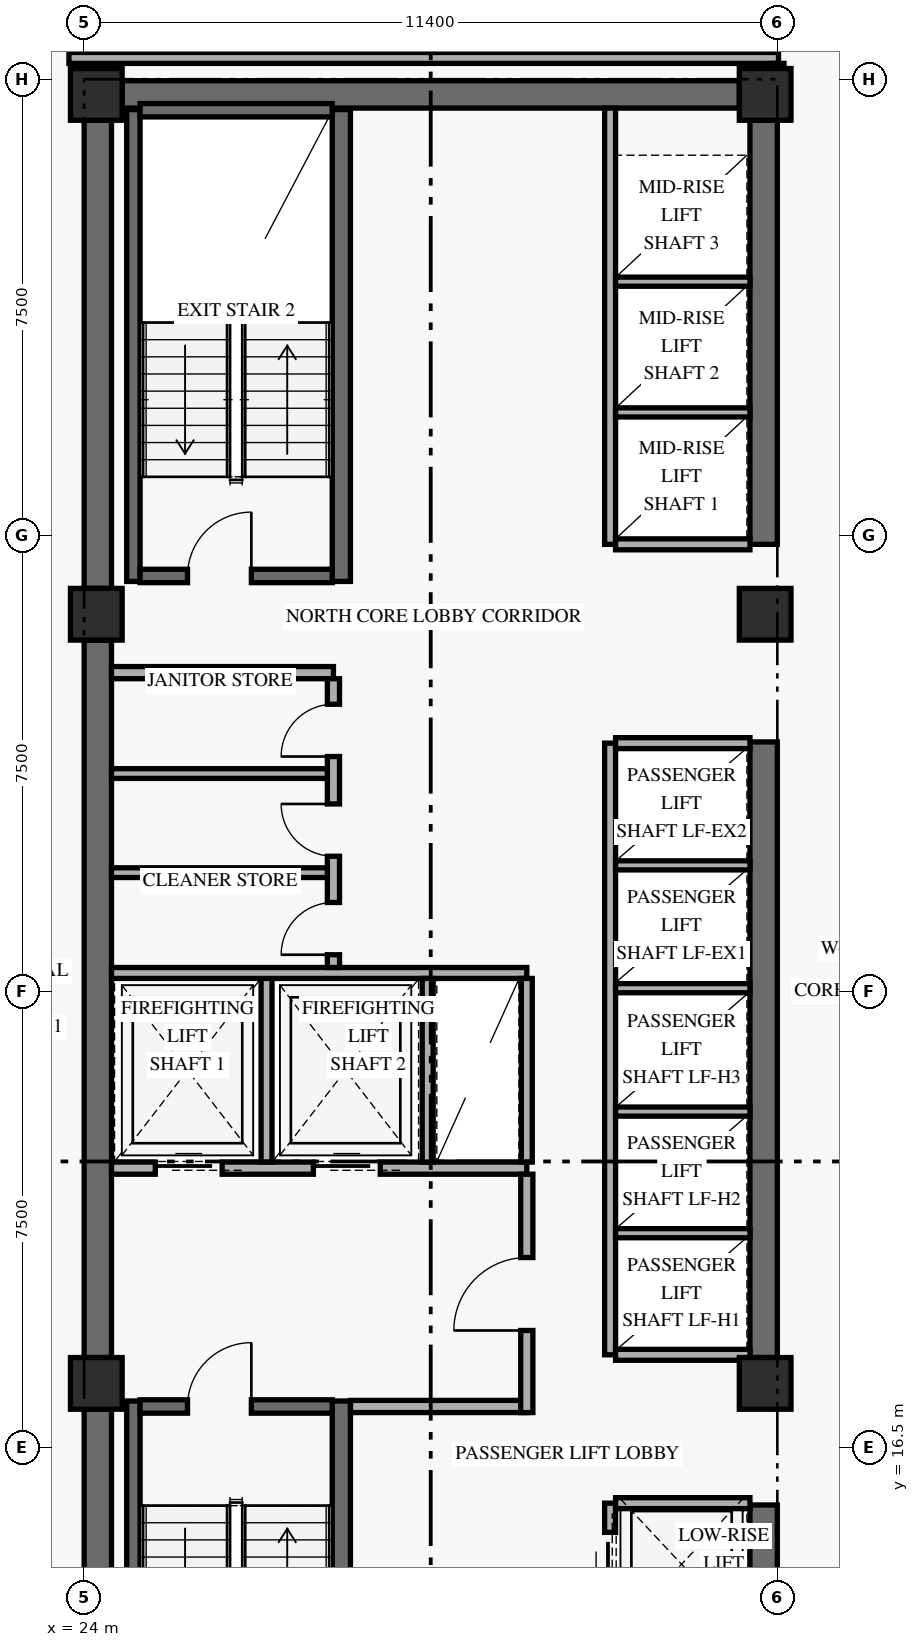
"""IFC4 building model, lengths in metres.
Left out: names, types, materials, properties, quantities, classifications, styles, units other than length and angle.
Written with IfcOpenShell. Run it as: python <this file> out.ifc"""

import sys

from ifc_helpers import new_model, si_unit, direction, frame, frame_2d, origin, origin_2d, place, context, subcontext, project, spatial, rectangle, extrude, element, fill, save


model = new_model("IFC4")
c1 = context("Model", 3, precision=1e-05, world=origin(), true_north=direction((0.0, 1.0)))
c2 = subcontext(c1, "Body", "Model", "MODEL_VIEW")
j1 = project(units=[si_unit("LENGTHUNIT", "METRE"), si_unit("PLANEANGLEUNIT", "RADIAN")], contexts=[c1])
p1 = place(None, origin())
s1 = spatial("IfcSite", under=j1, at=p1, CompositionType="ELEMENT")
p2 = place(p1, origin())
s2 = spatial("IfcBuilding", under=s1, at=p2, CompositionType="ELEMENT")
p3 = place(p2, frame((0.0, 0.0, 42.0)))
s3 = spatial("IfcBuildingStorey", under=s2, at=p3, CompositionType="ELEMENT", Elevation=42.0)
p4 = place(p3, frame((24.225, 9.675, 0.0), z_axis=(0.0, 0.0, 1.0), x_axis=(0.0, 1.0, 0.0)))
e1 = element("IfcWall", 1, at=p4, inside=s3, PredefinedType="SHEAR", context=c2, shape_type="SweptSolid", body=[
    extrude(rectangle(XDim=7.45, YDim=0.45, at=frame_2d((3.725, 0.0))), origin(), (0.0, 0.0, 1.0), 2.667),
])
p5 = place(p3, frame((24.225, 17.975, 0.0), z_axis=(0.0, 0.0, 1.0), x_axis=(0.0, 1.0, 0.0)))
e2 = element("IfcWall", 2, at=p5, inside=s3, PredefinedType="SHEAR", context=c2, shape_type="SweptSolid", body=[
    extrude(rectangle(XDim=11.8, YDim=0.45, at=frame_2d((5.9, 0.0))), origin(), (0.0, 0.0, 1.0), 2.667),
])
p6 = place(p3, frame((24.225, 30.625, 0.0), z_axis=(0.0, 0.0, 1.0), x_axis=(0.0, 1.0, 0.0)))
e3 = element("IfcWall", 3, at=p6, inside=s3, PredefinedType="SHEAR", context=c2, shape_type="SweptSolid", body=[
    extrude(rectangle(XDim=7.7, YDim=0.45, at=frame_2d((3.85, 0.0))), origin(), (0.0, 0.0, 1.0), 2.667),
])
p7 = place(p3, frame((35.175, 9.675, 0.0), z_axis=(0.0, 0.0, 1.0), x_axis=(0.0, 1.0, 0.0)))
e4 = element("IfcWall", 4, at=p7, inside=s3, PredefinedType="SHEAR", context=c2, shape_type="SweptSolid", body=[
    extrude(rectangle(XDim=5.875, YDim=0.45, at=frame_2d((2.938, 0.0))), origin(), (0.0, 0.0, 1.0), 2.667),
])
p8 = place(p3, frame((35.175, 17.975, 0.0), z_axis=(0.0, 0.0, 1.0), x_axis=(0.0, 1.0, 0.0)))
e5 = element("IfcWall", 5, at=p8, inside=s3, PredefinedType="SHEAR", context=c2, shape_type="SweptSolid", body=[
    extrude(rectangle(XDim=10.125, YDim=0.45, at=frame_2d((5.062, 0.0))), origin(), (0.0, 0.0, 1.0), 2.667),
])
p9 = place(p3, frame((35.175, 31.35, 0.0), z_axis=(0.0, 0.0, 1.0), x_axis=(0.0, 1.0, 0.0)))
e6 = element("IfcWall", 6, at=p9, inside=s3, PredefinedType="SHEAR", context=c2, shape_type="SweptSolid", body=[
    extrude(rectangle(XDim=6.975, YDim=0.45, at=frame_2d((3.487, 0.0))), origin(), (0.0, 0.0, 1.0), 2.667),
])
p10 = place(p3, frame((24.625, 38.75, 0.0), z_axis=(0.0, 0.0, 1.0), x_axis=(1.0, 0.0, 0.0)))
e7 = element("IfcWall", 7, at=p10, inside=s3, PredefinedType="SHEAR", context=c2, shape_type="SweptSolid", body=[
    extrude(rectangle(XDim=10.15, YDim=0.45, at=frame_2d((5.075, 0.0))), origin(), (0.0, 0.0, 1.0), 3.36),
])
p11 = place(p3, frame((24.81, 9.5, 0.0), z_axis=(0.0, 0.0, 1.0), x_axis=(0.0, 1.0, 0.0)))
e8 = element("IfcWall", 8, at=p11, inside=s3, PredefinedType="SHEAR", context=c2, shape_type="SweptSolid", body=[
    extrude(rectangle(XDim=7.76, YDim=0.22, at=frame_2d((3.88, 0.0))), origin(), (0.0, 0.0, 1.0), 3.36),
])
p12 = place(p3, frame((28.23, 9.5, 0.0), z_axis=(0.0, 0.0, 1.0), x_axis=(0.0, 1.0, 0.0)))
e9 = element("IfcWall", 9, at=p12, inside=s3, PredefinedType="SHEAR", context=c2, shape_type="SweptSolid", body=[
    extrude(rectangle(XDim=7.76, YDim=0.3, at=frame_2d((3.88, 0.0))), origin(), (0.0, 0.0, 1.0), 3.36),
])
p13 = place(p3, frame((24.92, 17.17, 0.0), z_axis=(0.0, 0.0, 1.0), x_axis=(1.0, 0.0, 0.0)))
e10 = element("IfcWall", 10, at=p13, inside=s3, PredefinedType="SHEAR", context=c2, shape_type="SweptSolid", body=[
    extrude(rectangle(XDim=3.16, YDim=0.22, at=frame_2d((1.58, 0.0))), origin(), (0.0, 0.0, 1.0), 3.36),
])
p14 = place(p13, frame((0.78, 0.0, 0.0)))
e11 = element("IfcOpeningElement", 11, at=p14, cuts=e10, PredefinedType="OPENING", context=c2, shape_type="SweptSolid", body=[
    extrude(rectangle(XDim=1.05, YDim=2.15, at=frame_2d((0.525, 1.075))), frame((0.0, 0.12, 0.0), z_axis=(0.0, -1.0, 0.0), x_axis=(1.0, 0.0, 0.0)), (0.0, 0.0, 1.0), 0.24),
])
p15 = place(p3, frame((24.81, 30.74, 0.0), z_axis=(0.0, 0.0, 1.0), x_axis=(0.0, 1.0, 0.0)))
e12 = element("IfcWall", 12, at=p15, inside=s3, PredefinedType="SHEAR", context=c2, shape_type="SweptSolid", body=[
    extrude(rectangle(XDim=7.76, YDim=0.22, at=frame_2d((3.88, 0.0))), origin(), (0.0, 0.0, 1.0), 3.36),
])
p16 = place(p3, frame((28.23, 30.74, 0.0), z_axis=(0.0, 0.0, 1.0), x_axis=(0.0, 1.0, 0.0)))
e13 = element("IfcWall", 13, at=p16, inside=s3, PredefinedType="SHEAR", context=c2, shape_type="SweptSolid", body=[
    extrude(rectangle(XDim=7.76, YDim=0.3, at=frame_2d((3.88, 0.0))), origin(), (0.0, 0.0, 1.0), 3.36),
])
p17 = place(p3, frame((24.92, 30.83, 0.0), z_axis=(0.0, 0.0, 1.0), x_axis=(1.0, 0.0, 0.0)))
e14 = element("IfcWall", 14, at=p17, inside=s3, PredefinedType="SHEAR", context=c2, shape_type="SweptSolid", body=[
    extrude(rectangle(XDim=3.16, YDim=0.22, at=frame_2d((1.58, 0.0))), origin(), (0.0, 0.0, 1.0), 3.36),
])
p18 = place(p17, frame((0.78, 0.0, 0.0)))
e15 = element("IfcOpeningElement", 15, at=p18, cuts=e14, PredefinedType="OPENING", context=c2, shape_type="SweptSolid", body=[
    extrude(rectangle(XDim=1.05, YDim=2.15, at=frame_2d((0.525, 1.075))), frame((0.0, 0.12, 0.0), z_axis=(0.0, -1.0, 0.0), x_axis=(1.0, 0.0, 0.0)), (0.0, 0.0, 1.0), 0.24),
])
p19 = place(p3, frame((24.92, 38.49, 0.0), z_axis=(0.0, 0.0, 1.0), x_axis=(1.0, 0.0, 0.0)))
e16 = element("IfcWall", 16, at=p19, inside=s3, PredefinedType="SHEAR", context=c2, shape_type="SweptSolid", body=[
    extrude(rectangle(XDim=3.16, YDim=0.22, at=frame_2d((1.58, 0.0))), origin(), (0.0, 0.0, 1.0), 3.36),
])
for number, where, z_axis, x_axis in (
    (17, (24.2, 17.55, 0.0), (0.0, 0.0, 1.0), (1.0, 0.0, 0.0)),
    (18, (24.2, 30.2, 0.0), (0.0, 0.0, 1.0), (1.0, 0.0, 0.0)),
    (19, (24.2, 38.75, 0.0), (0.0, 0.0, 1.0), (1.0, 0.0, 0.0)),
    (20, (35.2, 17.55, 0.0), (0.0, 0.0, 1.0), (1.0, 0.0, 0.0)),
    (21, (35.2, 30.2, 0.0), (0.0, 0.0, 1.0), (1.0, 0.0, 0.0)),
    (22, (35.2, 38.75, 0.0), (0.0, 0.0, 1.0), (1.0, 0.0, 0.0)),
):
    element("IfcColumn", number, at=place(p3, frame(where, z_axis=z_axis, x_axis=x_axis)), inside=s3, PredefinedType="COLUMN", context=c2, shape_type="SweptSolid", body=[
        extrude(rectangle(XDim=0.85, YDim=0.85, at=origin_2d()), origin(), (0.0, 0.0, 1.0), 3.6),
    ])
p20 = place(p3, frame((24.45, 21.09, 0.0), z_axis=(0.0, 0.0, 1.0), x_axis=(1.0, 0.0, 0.0)))
e23 = element("IfcWall", 23, at=p20, inside=s3, PredefinedType="STANDARD", context=c2, shape_type="SweptSolid", body=[
    extrude(rectangle(XDim=6.83, YDim=0.2, at=frame_2d((3.415, 0.0))), origin(), (0.0, 0.0, 1.0), 3.36),
])
p21 = place(p20, frame((0.72, 0.0, 0.0)))
e24 = element("IfcOpeningElement", 24, at=p21, cuts=e23, PredefinedType="OPENING", context=c2, shape_type="SweptSolid", body=[
    extrude(rectangle(XDim=1.1, YDim=2.2, at=frame_2d((0.55, 1.1))), frame((0.0, 0.11, 0.0), z_axis=(0.0, -1.0, 0.0), x_axis=(1.0, 0.0, 0.0)), (0.0, 0.0, 1.0), 0.22),
])
p22 = place(p20, frame((3.32, 0.0, 0.0)))
e25 = element("IfcOpeningElement", 25, at=p22, cuts=e23, PredefinedType="OPENING", context=c2, shape_type="SweptSolid", body=[
    extrude(rectangle(XDim=1.1, YDim=2.2, at=frame_2d((0.55, 1.1))), frame((0.0, 0.11, 0.0), z_axis=(0.0, -1.0, 0.0), x_axis=(1.0, 0.0, 0.0)), (0.0, 0.0, 1.0), 0.22),
])
p23 = place(p3, frame((28.38, 17.17, 0.0), z_axis=(0.0, 0.0, 1.0), x_axis=(1.0, 0.0, 0.0)))
e26 = element("IfcWall", 26, at=p23, inside=s3, PredefinedType="STANDARD", context=c2, shape_type="SweptSolid", body=[
    extrude(rectangle(XDim=2.9, YDim=0.2, at=frame_2d((1.45, 0.0))), origin(), (0.0, 0.0, 1.0), 3.36),
])
p24 = place(p3, frame((31.28, 17.07, 0.0), z_axis=(0.0, 0.0, 1.0), x_axis=(0.0, 1.0, 0.0)))
e27 = element("IfcWall", 27, at=p24, inside=s3, PredefinedType="STANDARD", context=c2, shape_type="SweptSolid", body=[
    extrude(rectangle(XDim=3.92, YDim=0.2, at=frame_2d((1.96, 0.0))), origin(), (0.0, 0.0, 1.0), 2.649),
])
p25 = place(p24, frame((1.35, 0.0, 0.0)))
e28 = element("IfcOpeningElement", 28, at=p25, cuts=e27, PredefinedType="OPENING", context=c2, shape_type="SweptSolid", body=[
    extrude(rectangle(XDim=1.2, YDim=2.15, at=frame_2d((0.6, 1.075))), frame((0.0, 0.11, 0.0), z_axis=(0.0, -1.0, 0.0), x_axis=(1.0, 0.0, 0.0)), (0.0, 0.0, 1.0), 0.22),
])
p26 = place(p3, frame((27.0, 21.19, 0.0), z_axis=(0.0, 0.0, 1.0), x_axis=(0.0, 1.0, 0.0)))
e29 = element("IfcWall", 29, at=p26, inside=s3, PredefinedType="STANDARD", context=c2, shape_type="SweptSolid", body=[
    extrude(rectangle(XDim=3.11, YDim=0.18, at=frame_2d((1.555, 0.0))), origin(), (0.0, 0.0, 1.0), 3.36),
])
p27 = place(p3, frame((24.45, 24.3, 0.0), z_axis=(0.0, 0.0, 1.0), x_axis=(1.0, 0.0, 0.0)))
e30 = element("IfcWall", 30, at=p27, inside=s3, PredefinedType="STANDARD", context=c2, shape_type="SweptSolid", body=[
    extrude(rectangle(XDim=6.83, YDim=0.18, at=frame_2d((3.415, 0.0))), origin(), (0.0, 0.0, 1.0), 3.36),
])
for number, where, z_axis, x_axis in (
    (31, (29.65, 21.19, 0.0), (0.0, 0.0, 1.0), (0.0, 1.0, 0.0)),
    (32, (31.28, 21.19, 0.0), (0.0, 0.0, 1.0), (0.0, 1.0, 0.0)),
):
    element("IfcWall", number, at=place(p3, frame(where, z_axis=z_axis, x_axis=x_axis)), inside=s3, PredefinedType="STANDARD", context=c2, shape_type="SweptSolid", body=[
        extrude(rectangle(XDim=3.02, YDim=0.18, at=frame_2d((1.51, 0.0))), origin(), (0.0, 0.0, 1.0), 3.36),
    ])
p28 = place(p3, frame((24.45, 29.24, 0.0), z_axis=(0.0, 0.0, 1.0), x_axis=(1.0, 0.0, 0.0)))
e33 = element("IfcWall", 33, at=p28, inside=s3, PredefinedType="STANDARD", context=c2, shape_type="SweptSolid", body=[
    extrude(rectangle(XDim=3.65, YDim=0.2, at=frame_2d((1.825, 0.0))), origin(), (0.0, 0.0, 1.0), 3.36),
])
p29 = place(p3, frame((28.1, 24.39, 0.0), z_axis=(0.0, 0.0, 1.0), x_axis=(0.0, 1.0, 0.0)))
e34 = element("IfcWall", 34, at=p29, inside=s3, PredefinedType="STANDARD", context=c2, shape_type="SweptSolid", body=[
    extrude(rectangle(XDim=4.75, YDim=0.2, at=frame_2d((2.375, 0.0))), origin(), (0.0, 0.0, 1.0), 3.36),
])
p30 = place(p29, frame((0.21, 0.0, 0.0)))
e35 = element("IfcOpeningElement", 35, at=p30, cuts=e34, PredefinedType="OPENING", context=c2, shape_type="SweptSolid", body=[
    extrude(rectangle(XDim=0.86, YDim=2.1, at=frame_2d((0.43, 1.05))), frame((0.0, 0.11, 0.0), z_axis=(0.0, -1.0, 0.0), x_axis=(1.0, 0.0, 0.0)), (0.0, 0.0, 1.0), 0.22),
])
p31 = place(p29, frame((1.83, 0.0, 0.0)))
e36 = element("IfcOpeningElement", 36, at=p31, cuts=e34, PredefinedType="OPENING", context=c2, shape_type="SweptSolid", body=[
    extrude(rectangle(XDim=0.86, YDim=2.1, at=frame_2d((0.43, 1.05))), frame((0.0, 0.11, 0.0), z_axis=(0.0, -1.0, 0.0), x_axis=(1.0, 0.0, 0.0)), (0.0, 0.0, 1.0), 0.22),
])
p32 = place(p29, frame((3.47, 0.0, 0.0)))
e37 = element("IfcOpeningElement", 37, at=p32, cuts=e34, PredefinedType="OPENING", context=c2, shape_type="SweptSolid", body=[
    extrude(rectangle(XDim=0.86, YDim=2.1, at=frame_2d((0.43, 1.05))), frame((0.0, 0.11, 0.0), z_axis=(0.0, -1.0, 0.0), x_axis=(1.0, 0.0, 0.0)), (0.0, 0.0, 1.0), 0.22),
])
for number, where, z_axis, x_axis in (
    (38, (24.45, 25.95, 0.0), (0.0, 0.0, 1.0), (1.0, 0.0, 0.0)),
    (39, (24.45, 27.58, 0.0), (0.0, 0.0, 1.0), (1.0, 0.0, 0.0)),
):
    element("IfcWall", number, at=place(p3, frame(where, z_axis=z_axis, x_axis=x_axis)), inside=s3, PredefinedType="PARTITIONING", context=c2, shape_type="SweptSolid", body=[
        extrude(rectangle(XDim=3.55, YDim=0.16, at=frame_2d((1.775, 0.0))), origin(), (0.0, 0.0, 1.0), 3.36),
    ])
p33 = place(p3, frame((32.65, 9.5, 0.0), z_axis=(0.0, 0.0, 1.0), x_axis=(0.0, 1.0, 0.0)))
e40 = element("IfcWall", 40, at=p33, inside=s3, PredefinedType="STANDARD", context=c2, shape_type="SweptSolid", body=[
    extrude(rectangle(XDim=6.08, YDim=0.18, at=frame_2d((3.04, 0.0))), origin(), (0.0, 0.0, 1.0), 3.36),
])
p34 = place(p33, frame((0.55, 0.0, 0.0)))
e41 = element("IfcOpeningElement", 41, at=p34, cuts=e40, PredefinedType="OPENING", context=c2, shape_type="SweptSolid", body=[
    extrude(rectangle(XDim=1.05, YDim=2.2, at=frame_2d((0.525, 1.1))), frame((0.0, 0.1, 0.0), z_axis=(0.0, -1.0, 0.0), x_axis=(1.0, 0.0, 0.0)), (0.0, 0.0, 1.0), 0.2),
])
p35 = place(p33, frame((2.55, 0.0, 0.0)))
e42 = element("IfcOpeningElement", 42, at=p35, cuts=e40, PredefinedType="OPENING", context=c2, shape_type="SweptSolid", body=[
    extrude(rectangle(XDim=1.05, YDim=2.2, at=frame_2d((0.525, 1.1))), frame((0.0, 0.1, 0.0), z_axis=(0.0, -1.0, 0.0), x_axis=(1.0, 0.0, 0.0)), (0.0, 0.0, 1.0), 0.2),
])
p36 = place(p33, frame((4.55, 0.0, 0.0)))
e43 = element("IfcOpeningElement", 43, at=p36, cuts=e40, PredefinedType="OPENING", context=c2, shape_type="SweptSolid", body=[
    extrude(rectangle(XDim=1.05, YDim=2.2, at=frame_2d((0.525, 1.1))), frame((0.0, 0.1, 0.0), z_axis=(0.0, -1.0, 0.0), x_axis=(1.0, 0.0, 0.0)), (0.0, 0.0, 1.0), 0.2),
])
p37 = place(p3, frame((32.74, 15.58, 0.0), z_axis=(0.0, 0.0, 1.0), x_axis=(1.0, 0.0, 0.0)))
e44 = element("IfcWall", 44, at=p37, inside=s3, PredefinedType="STANDARD", context=c2, shape_type="SweptSolid", body=[
    extrude(rectangle(XDim=2.21, YDim=0.18, at=frame_2d((1.105, 0.0))), origin(), (0.0, 0.0, 1.0), 3.36),
])
p38 = place(p3, frame((32.65, 18.02, 0.0), z_axis=(0.0, 0.0, 1.0), x_axis=(0.0, 1.0, 0.0)))
e45 = element("IfcWall", 45, at=p38, inside=s3, PredefinedType="STANDARD", context=c2, shape_type="SweptSolid", body=[
    extrude(rectangle(XDim=10.06, YDim=0.18, at=frame_2d((5.03, 0.0))), origin(), (0.0, 0.0, 1.0), 3.36),
])
for number, where, z_axis, x_axis in (
    (46, (32.74, 18.02, 0.0), (0.0, 0.0, 1.0), (1.0, 0.0, 0.0)),
    (47, (32.74, 28.08, 0.0), (0.0, 0.0, 1.0), (1.0, 0.0, 0.0)),
):
    element("IfcWall", number, at=place(p3, frame(where, z_axis=z_axis, x_axis=x_axis)), inside=s3, PredefinedType="STANDARD", context=c2, shape_type="SweptSolid", body=[
        extrude(rectangle(XDim=2.21, YDim=0.18, at=frame_2d((1.105, 0.0))), origin(), (0.0, 0.0, 1.0), 3.36),
    ])
for number, where, z_axis, x_axis in (
    (48, (32.74, 20.02, 0.0), (0.0, 0.0, 1.0), (1.0, 0.0, 0.0)),
    (49, (32.74, 22.02, 0.0), (0.0, 0.0, 1.0), (1.0, 0.0, 0.0)),
    (50, (32.74, 24.05, 0.0), (0.0, 0.0, 1.0), (1.0, 0.0, 0.0)),
    (51, (32.74, 26.07, 0.0), (0.0, 0.0, 1.0), (1.0, 0.0, 0.0)),
):
    element("IfcWall", number, at=place(p3, frame(where, z_axis=z_axis, x_axis=x_axis)), inside=s3, PredefinedType="STANDARD", context=c2, shape_type="SweptSolid", body=[
        extrude(rectangle(XDim=2.21, YDim=0.15, at=frame_2d((1.105, 0.0))), origin(), (0.0, 0.0, 1.0), 3.36),
    ])
p39 = place(p3, frame((32.65, 31.35, 0.0), z_axis=(0.0, 0.0, 1.0), x_axis=(0.0, 1.0, 0.0)))
e52 = element("IfcWall", 52, at=p39, inside=s3, PredefinedType="STANDARD", context=c2, shape_type="SweptSolid", body=[
    extrude(rectangle(XDim=7.175, YDim=0.18, at=frame_2d((3.587, 0.0))), origin(), (0.0, 0.0, 1.0), 3.36),
])
p40 = place(p3, frame((32.74, 31.35, 0.0), z_axis=(0.0, 0.0, 1.0), x_axis=(1.0, 0.0, 0.0)))
e53 = element("IfcWall", 53, at=p40, inside=s3, PredefinedType="STANDARD", context=c2, shape_type="SweptSolid", body=[
    extrude(rectangle(XDim=2.21, YDim=0.18, at=frame_2d((1.105, 0.0))), origin(), (0.0, 0.0, 1.0), 3.36),
])
for number, where, z_axis, x_axis in (
    (54, (32.74, 33.52, 0.0), (0.0, 0.0, 1.0), (1.0, 0.0, 0.0)),
    (55, (32.74, 35.67, 0.0), (0.0, 0.0, 1.0), (1.0, 0.0, 0.0)),
):
    element("IfcWall", number, at=place(p3, frame(where, z_axis=z_axis, x_axis=x_axis)), inside=s3, PredefinedType="STANDARD", context=c2, shape_type="SweptSolid", body=[
        extrude(rectangle(XDim=2.21, YDim=0.15, at=frame_2d((1.105, 0.0))), origin(), (0.0, 0.0, 1.0), 3.36),
    ])
p41 = place(p3, frame((23.75, 39.35, 0.0), z_axis=(0.0, 0.0, 1.0), x_axis=(1.0, 0.0, 0.0)))
e56 = element("IfcWall", 56, at=p41, inside=s3, PredefinedType="STANDARD", context=c2, shape_type="SweptSolid", body=[
    extrude(rectangle(XDim=11.67, YDim=0.18, at=frame_2d((5.835, 0.0))), origin(), (0.0, 0.0, 1.0), 2.649),
])
p42 = place(p3, frame((35.42, 38.75, 0.0), z_axis=(0.0, 0.0, 1.0), x_axis=(0.0, 1.0, 0.0)))
e57 = element("IfcWall", 57, at=p42, inside=s3, PredefinedType="STANDARD", context=c2, shape_type="SweptSolid", body=[
    extrude(rectangle(XDim=0.51, YDim=0.18, at=frame_2d((0.255, 0.0))), origin(), (0.0, 0.0, 1.0), 3.36),
])
p43 = place(p14, frame((1.05, 0.0, 0.0), z_axis=(0.0, 0.0, 1.0), x_axis=(-1.0, 0.0, 0.0)))
e58 = element("IfcDoor", 58, at=p43, inside=s3, OperationType="SINGLE_SWING_LEFT", PredefinedType="DOOR", context=c2, shape_type="SweptSolid", body=[
    extrude(rectangle(XDim=1.05, YDim=2.15, at=frame_2d((0.525, 1.075))), frame((0.0, 0.025, 0.0), z_axis=(0.0, -1.0, 0.0), x_axis=(1.0, 0.0, 0.0)), (0.0, 0.0, 1.0), 0.05),
])
fill(e11, e58)
p44 = place(p18, origin())
e59 = element("IfcDoor", 59, at=p44, inside=s3, OperationType="SINGLE_SWING_RIGHT", PredefinedType="DOOR", context=c2, shape_type="SweptSolid", body=[
    extrude(rectangle(XDim=1.05, YDim=2.15, at=frame_2d((0.525, 1.075))), frame((0.0, 0.025, 0.0), z_axis=(0.0, -1.0, 0.0), x_axis=(1.0, 0.0, 0.0)), (0.0, 0.0, 1.0), 0.05),
])
fill(e15, e59)
p45 = place(p21, origin())
e60 = element("IfcDoor", 60, at=p45, inside=s3, OperationType="SLIDING_TO_LEFT", PredefinedType="DOOR", context=c2, shape_type="SweptSolid", body=[
    extrude(rectangle(XDim=1.1, YDim=2.2, at=frame_2d((0.55, 1.1))), frame((0.0, 0.025, 0.0), z_axis=(0.0, -1.0, 0.0), x_axis=(1.0, 0.0, 0.0)), (0.0, 0.0, 1.0), 0.05),
])
fill(e24, e60)
p46 = place(p22, origin())
e61 = element("IfcDoor", 61, at=p46, inside=s3, OperationType="SLIDING_TO_LEFT", PredefinedType="DOOR", context=c2, shape_type="SweptSolid", body=[
    extrude(rectangle(XDim=1.1, YDim=2.2, at=frame_2d((0.55, 1.1))), frame((0.0, 0.025, 0.0), z_axis=(0.0, -1.0, 0.0), x_axis=(1.0, 0.0, 0.0)), (0.0, 0.0, 1.0), 0.05),
])
fill(e25, e61)
p47 = place(p25, origin())
e62 = element("IfcDoor", 62, at=p47, inside=s3, OperationType="SINGLE_SWING_LEFT", PredefinedType="DOOR", context=c2, shape_type="SweptSolid", body=[
    extrude(rectangle(XDim=1.2, YDim=2.15, at=frame_2d((0.6, 1.075))), frame((0.0, 0.025, 0.0), z_axis=(0.0, -1.0, 0.0), x_axis=(1.0, 0.0, 0.0)), (0.0, 0.0, 1.0), 0.05),
])
fill(e28, e62)
p48 = place(p30, origin())
e63 = element("IfcDoor", 63, at=p48, inside=s3, OperationType="SINGLE_SWING_LEFT", PredefinedType="DOOR", context=c2, shape_type="SweptSolid", body=[
    extrude(rectangle(XDim=0.86, YDim=2.1, at=frame_2d((0.43, 1.05))), frame((0.0, 0.025, 0.0), z_axis=(0.0, -1.0, 0.0), x_axis=(1.0, 0.0, 0.0)), (0.0, 0.0, 1.0), 0.05),
])
fill(e35, e63)
p49 = place(p31, origin())
e64 = element("IfcDoor", 64, at=p49, inside=s3, OperationType="SINGLE_SWING_RIGHT", PredefinedType="DOOR", context=c2, shape_type="SweptSolid", body=[
    extrude(rectangle(XDim=0.86, YDim=2.1, at=frame_2d((0.43, 1.05))), frame((0.0, 0.025, 0.0), z_axis=(0.0, -1.0, 0.0), x_axis=(1.0, 0.0, 0.0)), (0.0, 0.0, 1.0), 0.05),
])
fill(e36, e64)
p50 = place(p32, origin())
e65 = element("IfcDoor", 65, at=p50, inside=s3, OperationType="SINGLE_SWING_LEFT", PredefinedType="DOOR", context=c2, shape_type="SweptSolid", body=[
    extrude(rectangle(XDim=0.86, YDim=2.1, at=frame_2d((0.43, 1.05))), frame((0.0, 0.025, 0.0), z_axis=(0.0, -1.0, 0.0), x_axis=(1.0, 0.0, 0.0)), (0.0, 0.0, 1.0), 0.05),
])
fill(e37, e65)
p51 = place(p36, origin())
e66 = element("IfcDoor", 66, at=p51, inside=s3, OperationType="SLIDING_TO_LEFT", PredefinedType="DOOR", context=c2, shape_type="SweptSolid", body=[
    extrude(rectangle(XDim=1.05, YDim=2.2, at=frame_2d((0.525, 1.1))), frame((0.0, 0.025, 0.0), z_axis=(0.0, -1.0, 0.0), x_axis=(1.0, 0.0, 0.0)), (0.0, 0.0, 1.0), 0.05),
])
fill(e43, e66)
save(model, sys.argv[1])
